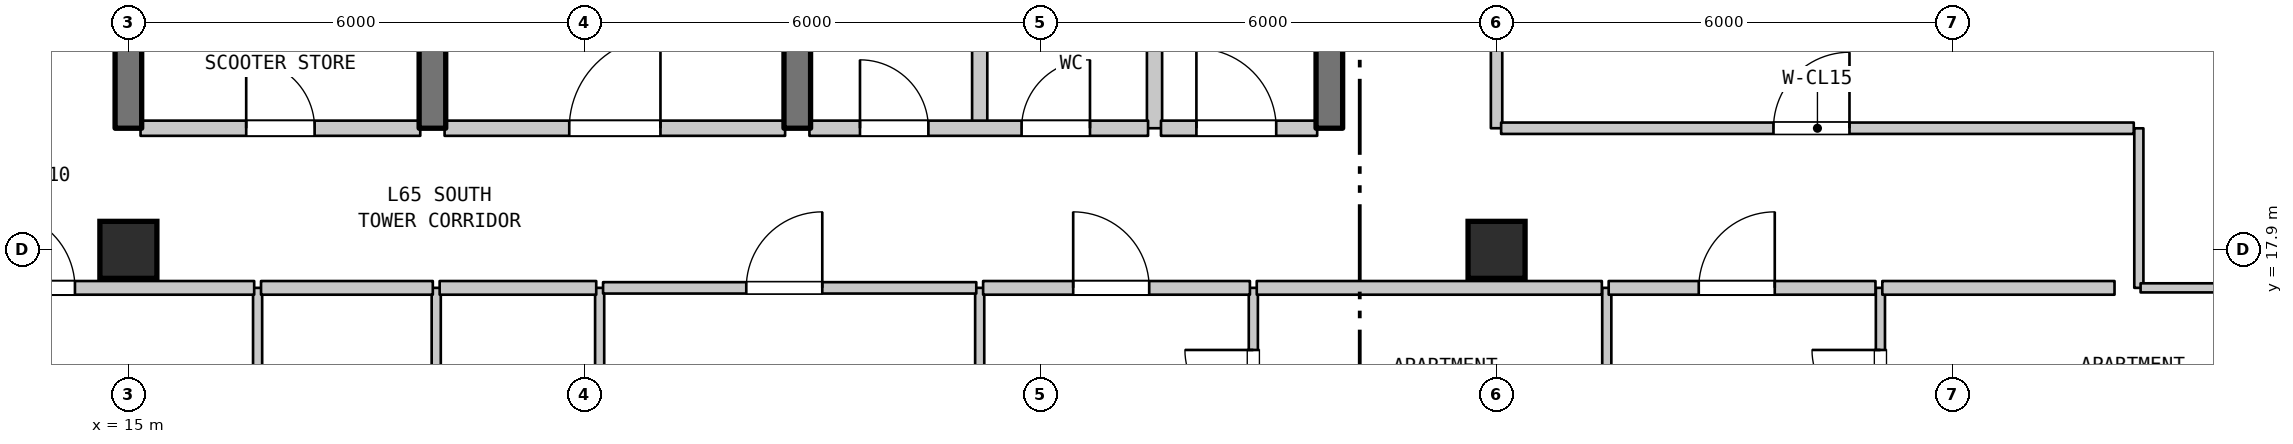
"""IFC4 building model, lengths in metres.
Left out: names, types, materials, properties, quantities, classifications, styles, units other than length and angle.
Written with IfcOpenShell. Run it as: python <this file> out.ifc"""

import sys

from ifc_helpers import new_model, si_unit, direction, frame, frame_2d, origin, origin_2d, place, context, subcontext, project, spatial, rectangle, extrude, element, fill, save


model = new_model("IFC4")
c1 = context("Model", 3, precision=1e-05, world=origin(), true_north=direction((0.0, 1.0)))
c2 = subcontext(c1, "Body", "Model", "MODEL_VIEW")
j1 = project(units=[si_unit("LENGTHUNIT", "METRE"), si_unit("PLANEANGLEUNIT", "RADIAN")], contexts=[c1])
p1 = place(None, origin())
s1 = spatial("IfcSite", under=j1, at=p1, CompositionType="ELEMENT")
p2 = place(p1, origin())
s2 = spatial("IfcBuilding", under=s1, at=p2, CompositionType="ELEMENT")
p3 = place(p2, frame((0.0, 0.0, 262.1)))
s3 = spatial("IfcBuildingStorey", under=s2, at=p3, CompositionType="ELEMENT", Elevation=262.1)
for number, where, z_axis, x_axis in (
    (1, (15.0, 17.9, 0.0), (0.0, 0.0, 1.0), (1.0, 0.0, 0.0)),
    (2, (33.0, 17.9, 0.0), (0.0, 0.0, 1.0), (1.0, 0.0, 0.0)),
):
    element("IfcColumn", number, at=place(p3, frame(where, z_axis=z_axis, x_axis=x_axis)), inside=s3, PredefinedType="COLUMN", context=c2, shape_type="SweptSolid", body=[
        extrude(rectangle(XDim=0.75, YDim=0.75, at=origin_2d()), origin(), (0.0, 0.0, 1.0), 3.7),
    ])
p4 = place(p3, frame((15.0, 19.5, 0.0), z_axis=(0.0, 0.0, 1.0), x_axis=(0.0, 1.0, 0.0)))
e3 = element("IfcWall", 3, at=p4, inside=s3, PredefinedType="SHEAR", context=c2, shape_type="SweptSolid", body=[
    extrude(rectangle(XDim=3.2, YDim=0.35, at=frame_2d((1.6, 0.0))), origin(), (0.0, 0.0, 1.0), 3.39),
])
p5 = place(p3, frame((16.7, 14.2, 0.0), z_axis=(0.0, 0.0, 1.0), x_axis=(0.0, 1.0, 0.0)))
e4 = element("IfcWall", 4, at=p5, inside=s3, PredefinedType="PARTITIONING", context=c2, shape_type="SweptSolid", body=[
    extrude(rectangle(XDim=3.2, YDim=0.12, at=frame_2d((1.6, 0.0))), origin(), (0.0, 0.0, 1.0), 3.39),
])
p6 = place(p5, frame((1.15, 0.0, 0.0)))
e5 = element("IfcOpeningElement", 5, at=p6, cuts=e4, PredefinedType="OPENING", context=c2, shape_type="SweptSolid", body=[
    extrude(rectangle(XDim=0.9, YDim=2.15, at=frame_2d((0.45, 1.075))), frame((0.0, 0.07, 0.0), z_axis=(0.0, -1.0, 0.0), x_axis=(1.0, 0.0, 0.0)), (0.0, 0.0, 1.0), 0.14),
])
p7 = place(p3, frame((19.0, 19.5, 0.0), z_axis=(0.0, 0.0, 1.0), x_axis=(0.0, 1.0, 0.0)))
e6 = element("IfcWall", 6, at=p7, inside=s3, PredefinedType="SHEAR", context=c2, shape_type="SweptSolid", body=[
    extrude(rectangle(XDim=3.2, YDim=0.35, at=frame_2d((1.6, 0.0))), origin(), (0.0, 0.0, 1.0), 3.39),
])
p8 = place(p3, frame((19.05, 14.2, 0.0), z_axis=(0.0, 0.0, 1.0), x_axis=(0.0, 1.0, 0.0)))
e7 = element("IfcWall", 7, at=p8, inside=s3, PredefinedType="PARTITIONING", context=c2, shape_type="SweptSolid", body=[
    extrude(rectangle(XDim=3.2, YDim=0.12, at=frame_2d((1.6, 0.0))), origin(), (0.0, 0.0, 1.0), 3.39),
])
p9 = place(p3, frame((21.2, 6.923, 0.0), z_axis=(0.0, 0.0, 1.0), x_axis=(0.0, 1.0, 0.0)))
e8 = element("IfcWall", 8, at=p9, inside=s3, PredefinedType="PARTITIONING", context=c2, shape_type="SweptSolid", body=[
    extrude(rectangle(XDim=10.477, YDim=0.12, at=frame_2d((5.238, 0.0))), origin(), (0.0, 0.0, 1.0), 3.39),
])
p10 = place(p3, frame((23.8, 19.5, 0.0), z_axis=(0.0, 0.0, 1.0), x_axis=(0.0, 1.0, 0.0)))
e9 = element("IfcWall", 9, at=p10, inside=s3, PredefinedType="SHEAR", context=c2, shape_type="SweptSolid", body=[
    extrude(rectangle(XDim=3.2, YDim=0.35, at=frame_2d((1.6, 0.0))), origin(), (0.0, 0.0, 1.0), 3.39),
])
p11 = place(p3, frame((26.2, 6.71, 0.0), z_axis=(0.0, 0.0, 1.0), x_axis=(0.0, 1.0, 0.0)))
e10 = element("IfcWall", 10, at=p11, inside=s3, PredefinedType="PARTITIONING", context=c2, shape_type="SweptSolid", body=[
    extrude(rectangle(XDim=10.69, YDim=0.12, at=frame_2d((5.345, 0.0))), origin(), (0.0, 0.0, 1.0), 3.39),
])
for number, where, z_axis, x_axis in (
    (11, (26.2, 19.5, 0.0), (0.0, 0.0, 1.0), (0.0, 1.0, 0.0)),
    (12, (28.5, 19.5, 0.0), (0.0, 0.0, 1.0), (0.0, 1.0, 0.0)),
):
    element("IfcWall", number, at=place(p3, frame(where, z_axis=z_axis, x_axis=x_axis)), inside=s3, PredefinedType="STANDARD", context=c2, shape_type="SweptSolid", body=[
        extrude(rectangle(XDim=3.2, YDim=0.2, at=frame_2d((1.6, 0.0))), origin(), (0.0, 0.0, 1.0), 3.39),
    ])
p12 = place(p3, frame((29.8, 15.008, 0.0), z_axis=(0.0, 0.0, 1.0), x_axis=(0.0, 1.0, 0.0)))
e13 = element("IfcWall", 13, at=p12, inside=s3, PredefinedType="PARTITIONING", context=c2, shape_type="SweptSolid", body=[
    extrude(rectangle(XDim=2.392, YDim=0.12, at=frame_2d((1.196, 0.0))), origin(), (0.0, 0.0, 1.0), 3.39),
])
p13 = place(p12, frame((0.675, 0.0, 0.0)))
e14 = element("IfcOpeningElement", 14, at=p13, cuts=e13, PredefinedType="OPENING", context=c2, shape_type="SweptSolid", body=[
    extrude(rectangle(XDim=0.9, YDim=2.1, at=frame_2d((0.45, 1.05))), frame((0.0, 0.07, 0.0), z_axis=(0.0, -1.0, 0.0), x_axis=(1.0, 0.0, 0.0)), (0.0, 0.0, 1.0), 0.14),
])
p14 = place(p3, frame((30.8, 19.5, 0.0), z_axis=(0.0, 0.0, 1.0), x_axis=(0.0, 1.0, 0.0)))
e15 = element("IfcWall", 15, at=p14, inside=s3, PredefinedType="SHEAR", context=c2, shape_type="SweptSolid", body=[
    extrude(rectangle(XDim=3.2, YDim=0.35, at=frame_2d((1.6, 0.0))), origin(), (0.0, 0.0, 1.0), 3.39),
])
p15 = place(p3, frame((33.0, 19.5, 0.0), z_axis=(0.0, 0.0, 1.0), x_axis=(0.0, 1.0, 0.0)))
e16 = element("IfcWall", 16, at=p15, inside=s3, PredefinedType="STANDARD", context=c2, shape_type="SweptSolid", body=[
    extrude(rectangle(XDim=6.1, YDim=0.15, at=frame_2d((3.05, 0.0))), origin(), (0.0, 0.0, 1.0), 3.1),
])
p16 = place(p15, frame((1.545, 0.0, 0.0)))
e17 = element("IfcOpeningElement", 17, at=p16, cuts=e16, PredefinedType="OPENING", context=c2, shape_type="SweptSolid", body=[
    extrude(rectangle(XDim=1.0, YDim=2.15, at=frame_2d((0.5, 1.075))), frame((0.0, 0.085, 0.0), z_axis=(0.0, -1.0, 0.0), x_axis=(1.0, 0.0, 0.0)), (0.0, 0.0, 1.0), 0.17),
])
p17 = place(p3, frame((34.45, 15.008, 0.0), z_axis=(0.0, 0.0, 1.0), x_axis=(0.0, 1.0, 0.0)))
e18 = element("IfcWall", 18, at=p17, inside=s3, PredefinedType="PARTITIONING", context=c2, shape_type="SweptSolid", body=[
    extrude(rectangle(XDim=2.392, YDim=0.12, at=frame_2d((1.196, 0.0))), origin(), (0.0, 0.0, 1.0), 3.39),
])
p18 = place(p3, frame((38.05, 15.008, 0.0), z_axis=(0.0, 0.0, 1.0), x_axis=(0.0, 1.0, 0.0)))
e19 = element("IfcWall", 19, at=p18, inside=s3, PredefinedType="PARTITIONING", context=c2, shape_type="SweptSolid", body=[
    extrude(rectangle(XDim=2.392, YDim=0.12, at=frame_2d((1.196, 0.0))), origin(), (0.0, 0.0, 1.0), 3.39),
])
p19 = place(p18, frame((0.675, 0.0, 0.0)))
e20 = element("IfcOpeningElement", 20, at=p19, cuts=e19, PredefinedType="OPENING", context=c2, shape_type="SweptSolid", body=[
    extrude(rectangle(XDim=0.9, YDim=2.1, at=frame_2d((0.45, 1.05))), frame((0.0, 0.07, 0.0), z_axis=(0.0, -1.0, 0.0), x_axis=(1.0, 0.0, 0.0)), (0.0, 0.0, 1.0), 0.14),
])
p20 = place(p3, frame((41.45, 17.4, 0.0), z_axis=(0.0, 0.0, 1.0), x_axis=(0.0, 1.0, 0.0)))
e21 = element("IfcWall", 21, at=p20, inside=s3, PredefinedType="PARTITIONING", context=c2, shape_type="SweptSolid", body=[
    extrude(rectangle(XDim=2.099, YDim=0.12, at=frame_2d((1.05, 0.0))), origin(), (0.0, 0.0, 1.0), 3.39),
])
p21 = place(p3, frame((12.975, 17.4, 0.0), z_axis=(0.0, 0.0, 1.0), x_axis=(1.0, 0.0, 0.0)))
e22 = element("IfcWall", 22, at=p21, inside=s3, PredefinedType="STANDARD", context=c2, shape_type="SweptSolid", body=[
    extrude(rectangle(XDim=3.68, YDim=0.18, at=frame_2d((1.84, 0.0))), origin(), (0.0, 0.0, 1.0), 3.39),
])
p22 = place(p21, frame((0.322, 0.0, 0.0)))
e23 = element("IfcOpeningElement", 23, at=p22, cuts=e22, PredefinedType="OPENING", context=c2, shape_type="SweptSolid", body=[
    extrude(rectangle(XDim=1.0, YDim=2.15, at=frame_2d((0.5, 1.075))), frame((0.0, 0.1, 0.0), z_axis=(0.0, -1.0, 0.0), x_axis=(1.0, 0.0, 0.0)), (0.0, 0.0, 1.0), 0.2),
])
p23 = place(p3, frame((16.745, 17.4, 0.0), z_axis=(0.0, 0.0, 1.0), x_axis=(1.0, 0.0, 0.0)))
e24 = element("IfcWall", 24, at=p23, inside=s3, PredefinedType="STANDARD", context=c2, shape_type="SweptSolid", body=[
    extrude(rectangle(XDim=2.26, YDim=0.18, at=frame_2d((1.13, 0.0))), origin(), (0.0, 0.0, 1.0), 3.39),
])
p24 = place(p3, frame((19.095, 17.4, 0.0), z_axis=(0.0, 0.0, 1.0), x_axis=(1.0, 0.0, 0.0)))
e25 = element("IfcWall", 25, at=p24, inside=s3, PredefinedType="STANDARD", context=c2, shape_type="SweptSolid", body=[
    extrude(rectangle(XDim=2.06, YDim=0.18, at=frame_2d((1.03, 0.0))), origin(), (0.0, 0.0, 1.0), 3.39),
])
p25 = place(p3, frame((21.245, 17.4, 0.0), z_axis=(0.0, 0.0, 1.0), x_axis=(1.0, 0.0, 0.0)))
e26 = element("IfcWall", 26, at=p25, inside=s3, PredefinedType="STANDARD", context=c2, shape_type="SweptSolid", body=[
    extrude(rectangle(XDim=4.91, YDim=0.15, at=frame_2d((2.455, 0.0))), origin(), (0.0, 0.0, 1.0), 3.39),
])
p26 = place(p25, frame((1.884, 0.0, 0.0)))
e27 = element("IfcOpeningElement", 27, at=p26, cuts=e26, PredefinedType="OPENING", context=c2, shape_type="SweptSolid", body=[
    extrude(rectangle(XDim=1.0, YDim=2.15, at=frame_2d((0.5, 1.075))), frame((0.0, 0.085, 0.0), z_axis=(0.0, -1.0, 0.0), x_axis=(1.0, 0.0, 0.0)), (0.0, 0.0, 1.0), 0.17),
])
p27 = place(p3, frame((26.245, 17.4, 0.0), z_axis=(0.0, 0.0, 1.0), x_axis=(1.0, 0.0, 0.0)))
e28 = element("IfcWall", 28, at=p27, inside=s3, PredefinedType="STANDARD", context=c2, shape_type="SweptSolid", body=[
    extrude(rectangle(XDim=3.51, YDim=0.18, at=frame_2d((1.755, 0.0))), origin(), (0.0, 0.0, 1.0), 3.39),
])
p28 = place(p27, frame((1.185, 0.0, 0.0)))
e29 = element("IfcOpeningElement", 29, at=p28, cuts=e28, PredefinedType="OPENING", context=c2, shape_type="SweptSolid", body=[
    extrude(rectangle(XDim=1.0, YDim=2.15, at=frame_2d((0.5, 1.075))), frame((0.0, 0.1, 0.0), z_axis=(0.0, -1.0, 0.0), x_axis=(1.0, 0.0, 0.0)), (0.0, 0.0, 1.0), 0.2),
])
p29 = place(p3, frame((29.845, 17.4, 0.0), z_axis=(0.0, 0.0, 1.0), x_axis=(1.0, 0.0, 0.0)))
e30 = element("IfcWall", 30, at=p29, inside=s3, PredefinedType="STANDARD", context=c2, shape_type="SweptSolid", body=[
    extrude(rectangle(XDim=4.54, YDim=0.18, at=frame_2d((2.27, 0.0))), origin(), (0.0, 0.0, 1.0), 3.39),
])
p30 = place(p3, frame((34.475, 17.4, 0.0), z_axis=(0.0, 0.0, 1.0), x_axis=(1.0, 0.0, 0.0)))
e31 = element("IfcWall", 31, at=p30, inside=s3, PredefinedType="STANDARD", context=c2, shape_type="SweptSolid", body=[
    extrude(rectangle(XDim=3.51, YDim=0.18, at=frame_2d((1.755, 0.0))), origin(), (0.0, 0.0, 1.0), 3.39),
])
p31 = place(p30, frame((1.185, 0.0, 0.0)))
e32 = element("IfcOpeningElement", 32, at=p31, cuts=e31, PredefinedType="OPENING", context=c2, shape_type="SweptSolid", body=[
    extrude(rectangle(XDim=1.0, YDim=2.15, at=frame_2d((0.5, 1.075))), frame((0.0, 0.1, 0.0), z_axis=(0.0, -1.0, 0.0), x_axis=(1.0, 0.0, 0.0)), (0.0, 0.0, 1.0), 0.2),
])
p32 = place(p3, frame((38.075, 17.4, 0.0), z_axis=(0.0, 0.0, 1.0), x_axis=(1.0, 0.0, 0.0)))
e33 = element("IfcWall", 33, at=p32, inside=s3, PredefinedType="STANDARD", context=c2, shape_type="SweptSolid", body=[
    extrude(rectangle(XDim=3.055, YDim=0.18, at=frame_2d((1.527, 0.0))), origin(), (0.0, 0.0, 1.0), 3.39),
])
p33 = place(p3, frame((41.473, 17.4, 0.0), z_axis=(0.0, 0.0, 1.0), x_axis=(1.0, 0.0, 0.0)))
e34 = element("IfcWall", 34, at=p33, inside=s3, PredefinedType="PARTITIONING", context=c2, shape_type="SweptSolid", body=[
    extrude(rectangle(XDim=2.031, YDim=0.12, at=frame_2d((1.016, 0.0))), origin(), (0.0, 0.0, 1.0), 3.39),
])
p34 = place(p3, frame((15.16, 19.5, 0.0), z_axis=(0.0, 0.0, 1.0), x_axis=(1.0, 0.0, 0.0)))
e35 = element("IfcWall", 35, at=p34, inside=s3, PredefinedType="STANDARD", context=c2, shape_type="SweptSolid", body=[
    extrude(rectangle(XDim=3.68, YDim=0.2, at=frame_2d((1.84, 0.0))), origin(), (0.0, 0.0, 1.0), 3.39),
])
p35 = place(p34, frame((1.39, 0.0, 0.0)))
e36 = element("IfcOpeningElement", 36, at=p35, cuts=e35, PredefinedType="OPENING", context=c2, shape_type="SweptSolid", body=[
    extrude(rectangle(XDim=0.9, YDim=2.15, at=frame_2d((0.45, 1.075))), frame((0.0, 0.11, 0.0), z_axis=(0.0, -1.0, 0.0), x_axis=(1.0, 0.0, 0.0)), (0.0, 0.0, 1.0), 0.22),
])
p36 = place(p3, frame((19.16, 19.5, 0.0), z_axis=(0.0, 0.0, 1.0), x_axis=(1.0, 0.0, 0.0)))
e37 = element("IfcWall", 37, at=p36, inside=s3, PredefinedType="STANDARD", context=c2, shape_type="SweptSolid", body=[
    extrude(rectangle(XDim=4.48, YDim=0.2, at=frame_2d((2.24, 0.0))), origin(), (0.0, 0.0, 1.0), 3.39),
])
p37 = place(p36, frame((1.64, 0.0, 0.0)))
e38 = element("IfcOpeningElement", 38, at=p37, cuts=e37, PredefinedType="OPENING", context=c2, shape_type="SweptSolid", body=[
    extrude(rectangle(XDim=1.2, YDim=2.2, at=frame_2d((0.6, 1.1))), frame((0.0, 0.11, 0.0), z_axis=(0.0, -1.0, 0.0), x_axis=(1.0, 0.0, 0.0)), (0.0, 0.0, 1.0), 0.22),
])
p38 = place(p3, frame((23.96, 19.5, 0.0), z_axis=(0.0, 0.0, 1.0), x_axis=(1.0, 0.0, 0.0)))
e39 = element("IfcWall", 39, at=p38, inside=s3, PredefinedType="STANDARD", context=c2, shape_type="SweptSolid", body=[
    extrude(rectangle(XDim=4.455, YDim=0.2, at=frame_2d((2.228, 0.0))), origin(), (0.0, 0.0, 1.0), 3.39),
])
p39 = place(p38, frame((0.665, 0.0, 0.0)))
e40 = element("IfcOpeningElement", 40, at=p39, cuts=e39, PredefinedType="OPENING", context=c2, shape_type="SweptSolid", body=[
    extrude(rectangle(XDim=0.9, YDim=2.15, at=frame_2d((0.45, 1.075))), frame((0.0, 0.11, 0.0), z_axis=(0.0, -1.0, 0.0), x_axis=(1.0, 0.0, 0.0)), (0.0, 0.0, 1.0), 0.22),
])
p40 = place(p38, frame((2.791, 0.0, 0.0)))
e41 = element("IfcOpeningElement", 41, at=p40, cuts=e39, PredefinedType="OPENING", context=c2, shape_type="SweptSolid", body=[
    extrude(rectangle(XDim=0.9, YDim=2.15, at=frame_2d((0.45, 1.075))), frame((0.0, 0.11, 0.0), z_axis=(0.0, -1.0, 0.0), x_axis=(1.0, 0.0, 0.0)), (0.0, 0.0, 1.0), 0.22),
])
p41 = place(p3, frame((28.585, 19.5, 0.0), z_axis=(0.0, 0.0, 1.0), x_axis=(1.0, 0.0, 0.0)))
e42 = element("IfcWall", 42, at=p41, inside=s3, PredefinedType="STANDARD", context=c2, shape_type="SweptSolid", body=[
    extrude(rectangle(XDim=2.055, YDim=0.2, at=frame_2d((1.027, 0.0))), origin(), (0.0, 0.0, 1.0), 3.39),
])
p42 = place(p41, frame((0.466, 0.0, 0.0)))
e43 = element("IfcOpeningElement", 43, at=p42, cuts=e42, PredefinedType="OPENING", context=c2, shape_type="SweptSolid", body=[
    extrude(rectangle(XDim=1.05, YDim=2.15, at=frame_2d((0.525, 1.075))), frame((0.0, 0.11, 0.0), z_axis=(0.0, -1.0, 0.0), x_axis=(1.0, 0.0, 0.0)), (0.0, 0.0, 1.0), 0.22),
])
p43 = place(p3, frame((33.06, 19.5, 0.0), z_axis=(0.0, 0.0, 1.0), x_axis=(1.0, 0.0, 0.0)))
e44 = element("IfcWall", 44, at=p43, inside=s3, PredefinedType="STANDARD", context=c2, shape_type="SweptSolid", body=[
    extrude(rectangle(XDim=8.323, YDim=0.15, at=frame_2d((4.162, 0.0))), origin(), (0.0, 0.0, 1.0), 3.39),
])
p44 = place(p43, frame((3.583, 0.0, 0.0)))
e45 = element("IfcOpeningElement", 45, at=p44, cuts=e44, PredefinedType="OPENING", context=c2, shape_type="SweptSolid", body=[
    extrude(rectangle(XDim=1.0, YDim=2.15, at=frame_2d((0.5, 1.075))), frame((0.0, 0.085, 0.0), z_axis=(0.0, -1.0, 0.0), x_axis=(1.0, 0.0, 0.0)), (0.0, 0.0, 1.0), 0.17),
])
p45 = place(p13, origin())
e46 = element("IfcDoor", 46, at=p45, inside=s3, OperationType="SINGLE_SWING_RIGHT", PredefinedType="DOOR", context=c2, shape_type="SweptSolid", body=[
    extrude(rectangle(XDim=0.9, YDim=2.1, at=frame_2d((0.45, 1.05))), frame((0.0, 0.025, 0.0), z_axis=(0.0, -1.0, 0.0), x_axis=(1.0, 0.0, 0.0)), (0.0, 0.0, 1.0), 0.05),
])
fill(e14, e46)
p46 = place(p19, origin())
e47 = element("IfcDoor", 47, at=p46, inside=s3, OperationType="SINGLE_SWING_RIGHT", PredefinedType="DOOR", context=c2, shape_type="SweptSolid", body=[
    extrude(rectangle(XDim=0.9, YDim=2.1, at=frame_2d((0.45, 1.05))), frame((0.0, 0.025, 0.0), z_axis=(0.0, -1.0, 0.0), x_axis=(1.0, 0.0, 0.0)), (0.0, 0.0, 1.0), 0.05),
])
fill(e20, e47)
p47 = place(p22, origin())
e48 = element("IfcDoor", 48, at=p47, inside=s3, OperationType="SINGLE_SWING_LEFT", PredefinedType="DOOR", context=c2, shape_type="SweptSolid", body=[
    extrude(rectangle(XDim=1.0, YDim=2.15, at=frame_2d((0.5, 1.075))), frame((0.0, 0.025, 0.0), z_axis=(0.0, -1.0, 0.0), x_axis=(1.0, 0.0, 0.0)), (0.0, 0.0, 1.0), 0.05),
])
fill(e23, e48)
p48 = place(p26, origin())
e49 = element("IfcDoor", 49, at=p48, inside=s3, OperationType="SINGLE_SWING_RIGHT", PredefinedType="DOOR", context=c2, shape_type="SweptSolid", body=[
    extrude(rectangle(XDim=1.0, YDim=2.15, at=frame_2d((0.5, 1.075))), frame((0.0, 0.025, 0.0), z_axis=(0.0, -1.0, 0.0), x_axis=(1.0, 0.0, 0.0)), (0.0, 0.0, 1.0), 0.05),
])
fill(e27, e49)
p49 = place(p28, origin())
e50 = element("IfcDoor", 50, at=p49, inside=s3, OperationType="SINGLE_SWING_LEFT", PredefinedType="DOOR", context=c2, shape_type="SweptSolid", body=[
    extrude(rectangle(XDim=1.0, YDim=2.15, at=frame_2d((0.5, 1.075))), frame((0.0, 0.025, 0.0), z_axis=(0.0, -1.0, 0.0), x_axis=(1.0, 0.0, 0.0)), (0.0, 0.0, 1.0), 0.05),
])
fill(e29, e50)
p50 = place(p31, origin())
e51 = element("IfcDoor", 51, at=p50, inside=s3, OperationType="SINGLE_SWING_RIGHT", PredefinedType="DOOR", context=c2, shape_type="SweptSolid", body=[
    extrude(rectangle(XDim=1.0, YDim=2.15, at=frame_2d((0.5, 1.075))), frame((0.0, 0.025, 0.0), z_axis=(0.0, -1.0, 0.0), x_axis=(1.0, 0.0, 0.0)), (0.0, 0.0, 1.0), 0.05),
])
fill(e32, e51)
p51 = place(p35, origin())
e52 = element("IfcDoor", 52, at=p51, inside=s3, OperationType="SINGLE_SWING_LEFT", PredefinedType="DOOR", context=c2, shape_type="SweptSolid", body=[
    extrude(rectangle(XDim=0.9, YDim=2.15, at=frame_2d((0.45, 1.075))), frame((0.0, 0.025, 0.0), z_axis=(0.0, -1.0, 0.0), x_axis=(1.0, 0.0, 0.0)), (0.0, 0.0, 1.0), 0.05),
])
fill(e36, e52)
p52 = place(p37, origin())
e53 = element("IfcDoor", 53, at=p52, inside=s3, OperationType="SINGLE_SWING_RIGHT", PredefinedType="DOOR", context=c2, shape_type="SweptSolid", body=[
    extrude(rectangle(XDim=1.2, YDim=2.2, at=frame_2d((0.6, 1.1))), frame((0.0, 0.025, 0.0), z_axis=(0.0, -1.0, 0.0), x_axis=(1.0, 0.0, 0.0)), (0.0, 0.0, 1.0), 0.05),
])
fill(e38, e53)
p53 = place(p39, origin())
e54 = element("IfcDoor", 54, at=p53, inside=s3, OperationType="SINGLE_SWING_LEFT", PredefinedType="DOOR", context=c2, shape_type="SweptSolid", body=[
    extrude(rectangle(XDim=0.9, YDim=2.15, at=frame_2d((0.45, 1.075))), frame((0.0, 0.025, 0.0), z_axis=(0.0, -1.0, 0.0), x_axis=(1.0, 0.0, 0.0)), (0.0, 0.0, 1.0), 0.05),
])
fill(e40, e54)
p54 = place(p40, origin())
e55 = element("IfcDoor", 55, at=p54, inside=s3, OperationType="SINGLE_SWING_RIGHT", PredefinedType="DOOR", context=c2, shape_type="SweptSolid", body=[
    extrude(rectangle(XDim=0.9, YDim=2.15, at=frame_2d((0.45, 1.075))), frame((0.0, 0.025, 0.0), z_axis=(0.0, -1.0, 0.0), x_axis=(1.0, 0.0, 0.0)), (0.0, 0.0, 1.0), 0.05),
])
fill(e41, e55)
p55 = place(p42, origin())
e56 = element("IfcDoor", 56, at=p55, inside=s3, OperationType="SINGLE_SWING_LEFT", PredefinedType="DOOR", context=c2, shape_type="SweptSolid", body=[
    extrude(rectangle(XDim=1.05, YDim=2.15, at=frame_2d((0.525, 1.075))), frame((0.0, 0.025, 0.0), z_axis=(0.0, -1.0, 0.0), x_axis=(1.0, 0.0, 0.0)), (0.0, 0.0, 1.0), 0.05),
])
fill(e43, e56)
p56 = place(p44, origin())
e57 = element("IfcDoor", 57, at=p56, inside=s3, OperationType="SINGLE_SWING_RIGHT", PredefinedType="DOOR", context=c2, shape_type="SweptSolid", body=[
    extrude(rectangle(XDim=1.0, YDim=2.15, at=frame_2d((0.5, 1.075))), frame((0.0, 0.025, 0.0), z_axis=(0.0, -1.0, 0.0), x_axis=(1.0, 0.0, 0.0)), (0.0, 0.0, 1.0), 0.05),
])
fill(e45, e57)
save(model, sys.argv[1])
